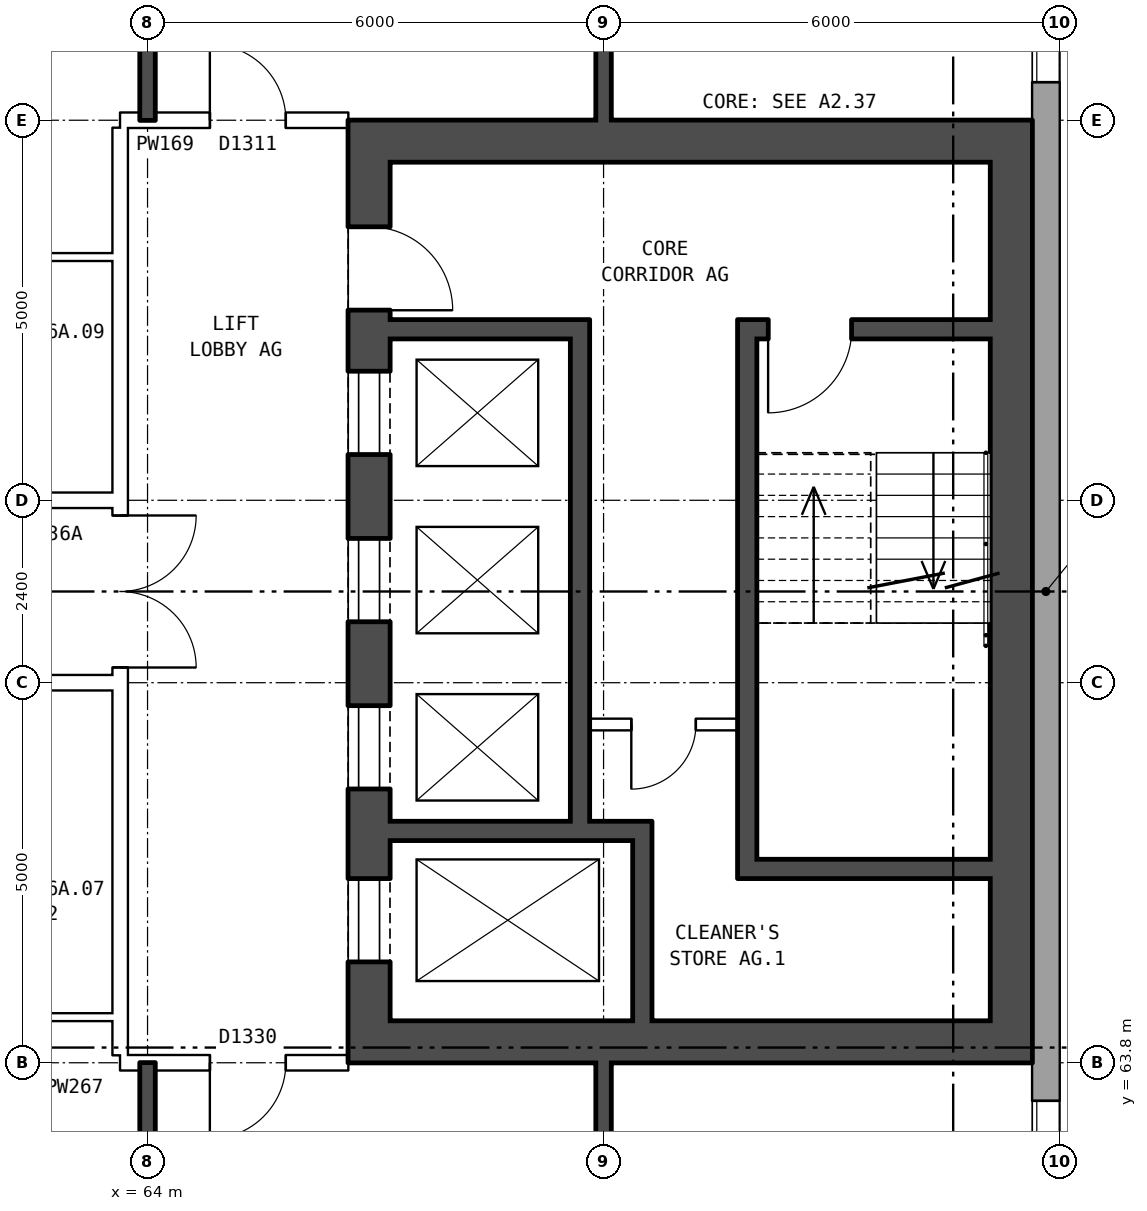
"""IFC4 building model, lengths in metres.
Left out: names, types, materials, properties, quantities, classifications, styles, units other than length and angle.
Written with IfcOpenShell. Run it as: python <this file> out.ifc"""

import sys

from ifc_helpers import new_model, si_unit, direction, frame, frame_2d, origin, place, context, subcontext, project, spatial, rectangle, extrude, element, fill, save


model = new_model("IFC4")
c1 = context("Model", 3, precision=1e-05, world=origin(), true_north=direction((0.0, 1.0)))
c2 = subcontext(c1, "Body", "Model", "MODEL_VIEW")
j1 = project(units=[si_unit("LENGTHUNIT", "METRE"), si_unit("PLANEANGLEUNIT", "RADIAN")], contexts=[c1])
p1 = place(None, origin())
s1 = spatial("IfcSite", under=j1, at=p1, CompositionType="ELEMENT")
p2 = place(p1, origin())
s2 = spatial("IfcBuilding", under=s1, at=p2, CompositionType="ELEMENT")
p3 = place(p2, frame((0.0, 0.0, 129.9)))
s3 = spatial("IfcBuildingStorey", under=s2, at=p3, CompositionType="ELEMENT", Elevation=129.9)
p4 = place(p3, frame((75.82, 57.075, 0.0), z_axis=(0.0, 0.0, 1.0), x_axis=(0.0, 1.0, 0.0)))
e1 = element("IfcWall", 1, at=p4, inside=s3, PredefinedType="STANDARD", context=c2, shape_type="SweptSolid", body=[
    extrude(rectangle(XDim=25.851, YDim=0.36, at=frame_2d((12.925, 0.0))), origin(), (0.0, 0.0, 1.0), 2.85),
])
p5 = place(p4, frame((1.625, 0.0, 0.8)))
e2 = element("IfcOpeningElement", 2, at=p5, cuts=e1, PredefinedType="OPENING", context=c2, shape_type="SweptSolid", body=[
    extrude(rectangle(XDim=1.6, YDim=1.8, at=frame_2d((0.8, 0.9))), frame((0.0, 0.19, 0.0), z_axis=(0.0, -1.0, 0.0), x_axis=(1.0, 0.0, 0.0)), (0.0, 0.0, 1.0), 0.38),
])
p6 = place(p4, frame((4.625, 0.0, 0.8)))
e3 = element("IfcOpeningElement", 3, at=p6, cuts=e1, PredefinedType="OPENING", context=c2, shape_type="SweptSolid", body=[
    extrude(rectangle(XDim=1.6, YDim=1.8, at=frame_2d((0.8, 0.9))), frame((0.0, 0.19, 0.0), z_axis=(0.0, -1.0, 0.0), x_axis=(1.0, 0.0, 0.0)), (0.0, 0.0, 1.0), 0.38),
])
p7 = place(p4, frame((19.625, 0.0, 0.8)))
e4 = element("IfcOpeningElement", 4, at=p7, cuts=e1, PredefinedType="OPENING", context=c2, shape_type="SweptSolid", body=[
    extrude(rectangle(XDim=1.6, YDim=1.8, at=frame_2d((0.8, 0.9))), frame((0.0, 0.19, 0.0), z_axis=(0.0, -1.0, 0.0), x_axis=(1.0, 0.0, 0.0)), (0.0, 0.0, 1.0), 0.38),
])
p8 = place(p4, frame((22.625, 0.0, 0.8)))
e5 = element("IfcOpeningElement", 5, at=p8, cuts=e1, PredefinedType="OPENING", context=c2, shape_type="SweptSolid", body=[
    extrude(rectangle(XDim=1.6, YDim=1.8, at=frame_2d((0.8, 0.9))), frame((0.0, 0.19, 0.0), z_axis=(0.0, -1.0, 0.0), x_axis=(1.0, 0.0, 0.0)), (0.0, 0.0, 1.0), 0.38),
])
p9 = place(p3, frame((66.915, 63.8, 0.0), z_axis=(0.0, 0.0, 1.0), x_axis=(0.0, 1.0, 0.0)))
e6 = element("IfcWall", 6, at=p9, inside=s3, PredefinedType="SHEAR", context=c2, shape_type="SweptSolid", body=[
    extrude(rectangle(XDim=12.4, YDim=0.55, at=frame_2d((6.2, 0.0))), origin(), (0.0, 0.0, 1.0), 2.85),
])
p10 = place(p9, frame((1.325, 0.0, 0.0)))
e7 = element("IfcOpeningElement", 7, at=p10, cuts=e6, PredefinedType="OPENING", context=c2, shape_type="SweptSolid", body=[
    extrude(rectangle(XDim=1.1, YDim=2.1, at=frame_2d((0.55, 1.05))), frame((0.0, 0.285, 0.0), z_axis=(0.0, -1.0, 0.0), x_axis=(1.0, 0.0, 0.0)), (0.0, 0.0, 1.0), 0.57),
])
p11 = place(p9, frame((3.6, 0.0, 0.0)))
e8 = element("IfcOpeningElement", 8, at=p11, cuts=e6, PredefinedType="OPENING", context=c2, shape_type="SweptSolid", body=[
    extrude(rectangle(XDim=1.1, YDim=2.1, at=frame_2d((0.55, 1.05))), frame((0.0, 0.285, 0.0), z_axis=(0.0, -1.0, 0.0), x_axis=(1.0, 0.0, 0.0)), (0.0, 0.0, 1.0), 0.57),
])
p12 = place(p9, frame((5.8, 0.0, 0.0)))
e9 = element("IfcOpeningElement", 9, at=p12, cuts=e6, PredefinedType="OPENING", context=c2, shape_type="SweptSolid", body=[
    extrude(rectangle(XDim=1.1, YDim=2.1, at=frame_2d((0.55, 1.05))), frame((0.0, 0.285, 0.0), z_axis=(0.0, -1.0, 0.0), x_axis=(1.0, 0.0, 0.0)), (0.0, 0.0, 1.0), 0.57),
])
p13 = place(p9, frame((8.0, 0.0, 0.0)))
e10 = element("IfcOpeningElement", 10, at=p13, cuts=e6, PredefinedType="OPENING", context=c2, shape_type="SweptSolid", body=[
    extrude(rectangle(XDim=1.1, YDim=2.1, at=frame_2d((0.55, 1.05))), frame((0.0, 0.285, 0.0), z_axis=(0.0, -1.0, 0.0), x_axis=(1.0, 0.0, 0.0)), (0.0, 0.0, 1.0), 0.57),
])
p14 = place(p9, frame((9.9, 0.0, 0.0)))
e11 = element("IfcOpeningElement", 11, at=p14, cuts=e6, PredefinedType="OPENING", context=c2, shape_type="SweptSolid", body=[
    extrude(rectangle(XDim=1.1, YDim=2.1, at=frame_2d((0.55, 1.05))), frame((0.0, 0.285, 0.0), z_axis=(0.0, -1.0, 0.0), x_axis=(1.0, 0.0, 0.0)), (0.0, 0.0, 1.0), 0.57),
])
p15 = place(p3, frame((75.365, 63.8, 0.0), z_axis=(0.0, 0.0, 1.0), x_axis=(0.0, 1.0, 0.0)))
e12 = element("IfcWall", 12, at=p15, inside=s3, PredefinedType="SHEAR", context=c2, shape_type="SweptSolid", body=[
    extrude(rectangle(XDim=12.4, YDim=0.55, at=frame_2d((6.2, 0.0))), origin(), (0.0, 0.0, 1.0), 2.85),
])
for number, where, z_axis, x_axis in (
    (13, (67.19, 64.075, 0.0), (0.0, 0.0, 1.0), (1.0, 0.0, 0.0)),
    (14, (67.19, 75.925, 0.0), (0.0, 0.0, 1.0), (1.0, 0.0, 0.0)),
):
    element("IfcWall", number, at=place(p3, frame(where, z_axis=z_axis, x_axis=x_axis)), inside=s3, PredefinedType="SHEAR", context=c2, shape_type="SweptSolid", body=[
        extrude(rectangle(XDim=7.9, YDim=0.55, at=frame_2d((3.95, 0.0))), origin(), (0.0, 0.0, 1.0), 2.85),
    ])
p16 = place(p3, frame((72.015, 66.35, 0.0), z_axis=(0.0, 0.0, 1.0), x_axis=(1.0, 0.0, 0.0)))
e15 = element("IfcWall", 15, at=p16, inside=s3, PredefinedType="SHEAR", context=c2, shape_type="SweptSolid", body=[
    extrude(rectangle(XDim=3.075, YDim=0.25, at=frame_2d((1.538, 0.0))), origin(), (0.0, 0.0, 1.0), 2.85),
])
p17 = place(p3, frame((67.19, 66.85, 0.0), z_axis=(0.0, 0.0, 1.0), x_axis=(1.0, 0.0, 0.0)))
e16 = element("IfcWall", 16, at=p17, inside=s3, PredefinedType="SHEAR", context=c2, shape_type="SweptSolid", body=[
    extrude(rectangle(XDim=3.445, YDim=0.25, at=frame_2d((1.723, 0.0))), origin(), (0.0, 0.0, 1.0), 2.85),
])
p18 = place(p3, frame((69.815, 68.25, 0.0), z_axis=(0.0, 0.0, 1.0), x_axis=(1.0, 0.0, 0.0)))
e17 = element("IfcWall", 17, at=p18, inside=s3, PredefinedType="PARTITIONING", context=c2, shape_type="SweptSolid", body=[
    extrude(rectangle(XDim=1.95, YDim=0.15, at=frame_2d((0.975, 0.0))), origin(), (0.0, 0.0, 1.0), 2.85),
])
p19 = place(p18, frame((0.55, 0.0, 0.0)))
e18 = element("IfcOpeningElement", 18, at=p19, cuts=e17, PredefinedType="OPENING", context=c2, shape_type="SweptSolid", body=[
    extrude(rectangle(XDim=0.85, YDim=2.1, at=frame_2d((0.425, 1.05))), frame((0.0, 0.085, 0.0), z_axis=(0.0, -1.0, 0.0), x_axis=(1.0, 0.0, 0.0)), (0.0, 0.0, 1.0), 0.17),
])
p20 = place(p3, frame((67.19, 73.45, 0.0), z_axis=(0.0, 0.0, 1.0), x_axis=(1.0, 0.0, 0.0)))
e19 = element("IfcWall", 19, at=p20, inside=s3, PredefinedType="SHEAR", context=c2, shape_type="SweptSolid", body=[
    extrude(rectangle(XDim=2.375, YDim=0.25, at=frame_2d((1.188, 0.0))), origin(), (0.0, 0.0, 1.0), 2.85),
])
p21 = place(p3, frame((72.015, 73.45, 0.0), z_axis=(0.0, 0.0, 1.0), x_axis=(1.0, 0.0, 0.0)))
e20 = element("IfcWall", 20, at=p21, inside=s3, PredefinedType="SHEAR", context=c2, shape_type="SweptSolid", body=[
    extrude(rectangle(XDim=3.075, YDim=0.25, at=frame_2d((1.538, 0.0))), origin(), (0.0, 0.0, 1.0), 2.85),
])
p22 = place(p21, frame((0.15, 0.0, 0.0)))
e21 = element("IfcOpeningElement", 21, at=p22, cuts=e20, PredefinedType="OPENING", context=c2, shape_type="SweptSolid", body=[
    extrude(rectangle(XDim=1.1, YDim=2.1, at=frame_2d((0.55, 1.05))), frame((0.0, 0.135, 0.0), z_axis=(0.0, -1.0, 0.0), x_axis=(1.0, 0.0, 0.0)), (0.0, 0.0, 1.0), 0.27),
])
p23 = place(p3, frame((69.69, 66.975, 0.0), z_axis=(0.0, 0.0, 1.0), x_axis=(0.0, 1.0, 0.0)))
e22 = element("IfcWall", 22, at=p23, inside=s3, PredefinedType="SHEAR", context=c2, shape_type="SweptSolid", body=[
    extrude(rectangle(XDim=6.6, YDim=0.25, at=frame_2d((3.3, 0.0))), origin(), (0.0, 0.0, 1.0), 2.85),
])
p24 = place(p3, frame((70.51, 64.35, 0.0), z_axis=(0.0, 0.0, 1.0), x_axis=(0.0, 1.0, 0.0)))
e23 = element("IfcWall", 23, at=p24, inside=s3, PredefinedType="SHEAR", context=c2, shape_type="SweptSolid", body=[
    extrude(rectangle(XDim=2.375, YDim=0.25, at=frame_2d((1.188, 0.0))), origin(), (0.0, 0.0, 1.0), 2.85),
])
p25 = place(p3, frame((71.89, 66.225, 0.0), z_axis=(0.0, 0.0, 1.0), x_axis=(0.0, 1.0, 0.0)))
e24 = element("IfcWall", 24, at=p25, inside=s3, PredefinedType="SHEAR", context=c2, shape_type="SweptSolid", body=[
    extrude(rectangle(XDim=7.35, YDim=0.25, at=frame_2d((3.675, 0.0))), origin(), (0.0, 0.0, 1.0), 2.85),
])
p26 = place(p3, frame((63.64, 63.9, 0.0), z_axis=(0.0, 0.0, 1.0), x_axis=(0.0, 1.0, 0.0)))
e25 = element("IfcWall", 25, at=p26, inside=s3, PredefinedType="PARTITIONING", context=c2, shape_type="SweptSolid", body=[
    extrude(rectangle(XDim=12.2, YDim=0.2, at=frame_2d((6.1, 0.0))), origin(), (0.0, 0.0, 1.0), 2.85),
])
p27 = place(p26, frame((5.1, 0.0, 0.0)))
e26 = element("IfcOpeningElement", 26, at=p27, cuts=e25, PredefinedType="OPENING", context=c2, shape_type="SweptSolid", body=[
    extrude(rectangle(XDim=2.0, YDim=2.1, at=frame_2d((1.0, 1.05))), frame((0.0, 0.11, 0.0), z_axis=(0.0, -1.0, 0.0), x_axis=(1.0, 0.0, 0.0)), (0.0, 0.0, 1.0), 0.22),
])
p28 = place(p3, frame((63.64, 63.8, 0.0), z_axis=(0.0, 0.0, 1.0), x_axis=(1.0, 0.0, 0.0)))
e27 = element("IfcWall", 27, at=p28, inside=s3, PredefinedType="PARTITIONING", context=c2, shape_type="SweptSolid", body=[
    extrude(rectangle(XDim=3.0, YDim=0.2, at=frame_2d((1.5, 0.0))), origin(), (0.0, 0.0, 1.0), 2.85),
])
p29 = place(p28, frame((1.18, 0.0, 0.0)))
e28 = element("IfcOpeningElement", 28, at=p29, cuts=e27, PredefinedType="OPENING", context=c2, shape_type="SweptSolid", body=[
    extrude(rectangle(XDim=1.0, YDim=2.1, at=frame_2d((0.5, 1.05))), frame((0.0, 0.11, 0.0), z_axis=(0.0, -1.0, 0.0), x_axis=(1.0, 0.0, 0.0)), (0.0, 0.0, 1.0), 0.22),
])
p30 = place(p3, frame((61.0, 64.4, 0.0), z_axis=(0.0, 0.0, 1.0), x_axis=(1.0, 0.0, 0.0)))
e29 = element("IfcWall", 29, at=p30, inside=s3, PredefinedType="PARTITIONING", context=c2, shape_type="SweptSolid", body=[
    extrude(rectangle(XDim=2.64, YDim=0.1, at=frame_2d((1.32, 0.0))), origin(), (0.0, 0.0, 1.0), 2.85),
])
p31 = place(p3, frame((44.36, 68.8, 0.0), z_axis=(0.0, 0.0, 1.0), x_axis=(1.0, 0.0, 0.0)))
e30 = element("IfcWall", 30, at=p31, inside=s3, PredefinedType="PARTITIONING", context=c2, shape_type="SweptSolid", body=[
    extrude(rectangle(XDim=19.28, YDim=0.2, at=frame_2d((9.64, 0.0))), origin(), (0.0, 0.0, 1.0), 2.85),
])
p32 = place(p31, frame((14.64, 0.0, 0.0)))
e31 = element("IfcOpeningElement", 31, at=p32, cuts=e30, PredefinedType="OPENING", context=c2, shape_type="SweptSolid", body=[
    extrude(rectangle(XDim=1.0, YDim=2.1, at=frame_2d((0.5, 1.05))), frame((0.0, 0.11, 0.0), z_axis=(0.0, -1.0, 0.0), x_axis=(1.0, 0.0, 0.0)), (0.0, 0.0, 1.0), 0.22),
])
p33 = place(p31, frame((5.64, 0.0, 0.0)))
e32 = element("IfcOpeningElement", 32, at=p33, cuts=e30, PredefinedType="OPENING", context=c2, shape_type="SweptSolid", body=[
    extrude(rectangle(XDim=1.0, YDim=2.1, at=frame_2d((0.5, 1.05))), frame((0.0, 0.11, 0.0), z_axis=(0.0, -1.0, 0.0), x_axis=(1.0, 0.0, 0.0)), (0.0, 0.0, 1.0), 0.22),
])
p34 = place(p3, frame((44.36, 71.2, 0.0), z_axis=(0.0, 0.0, 1.0), x_axis=(1.0, 0.0, 0.0)))
e33 = element("IfcWall", 33, at=p34, inside=s3, PredefinedType="PARTITIONING", context=c2, shape_type="SweptSolid", body=[
    extrude(rectangle(XDim=19.28, YDim=0.2, at=frame_2d((9.64, 0.0))), origin(), (0.0, 0.0, 1.0), 2.85),
])
p35 = place(p34, frame((14.64, 0.0, 0.0)))
e34 = element("IfcOpeningElement", 34, at=p35, cuts=e33, PredefinedType="OPENING", context=c2, shape_type="SweptSolid", body=[
    extrude(rectangle(XDim=1.0, YDim=2.1, at=frame_2d((0.5, 1.05))), frame((0.0, 0.11, 0.0), z_axis=(0.0, -1.0, 0.0), x_axis=(1.0, 0.0, 0.0)), (0.0, 0.0, 1.0), 0.22),
])
p36 = place(p34, frame((5.64, 0.0, 0.0)))
e35 = element("IfcOpeningElement", 35, at=p36, cuts=e33, PredefinedType="OPENING", context=c2, shape_type="SweptSolid", body=[
    extrude(rectangle(XDim=1.0, YDim=2.1, at=frame_2d((0.5, 1.05))), frame((0.0, 0.11, 0.0), z_axis=(0.0, -1.0, 0.0), x_axis=(1.0, 0.0, 0.0)), (0.0, 0.0, 1.0), 0.22),
])
p37 = place(p3, frame((61.0, 74.4, 0.0), z_axis=(0.0, 0.0, 1.0), x_axis=(1.0, 0.0, 0.0)))
e36 = element("IfcWall", 36, at=p37, inside=s3, PredefinedType="PARTITIONING", context=c2, shape_type="SweptSolid", body=[
    extrude(rectangle(XDim=2.64, YDim=0.1, at=frame_2d((1.32, 0.0))), origin(), (0.0, 0.0, 1.0), 2.85),
])
p38 = place(p3, frame((63.64, 76.2, 0.0), z_axis=(0.0, 0.0, 1.0), x_axis=(1.0, 0.0, 0.0)))
e37 = element("IfcWall", 37, at=p38, inside=s3, PredefinedType="PARTITIONING", context=c2, shape_type="SweptSolid", body=[
    extrude(rectangle(XDim=3.0, YDim=0.2, at=frame_2d((1.5, 0.0))), origin(), (0.0, 0.0, 1.0), 2.85),
])
p39 = place(p38, frame((1.18, 0.0, 0.0)))
e38 = element("IfcOpeningElement", 38, at=p39, cuts=e37, PredefinedType="OPENING", context=c2, shape_type="SweptSolid", body=[
    extrude(rectangle(XDim=1.0, YDim=2.1, at=frame_2d((0.5, 1.05))), frame((0.0, 0.11, 0.0), z_axis=(0.0, -1.0, 0.0), x_axis=(1.0, 0.0, 0.0)), (0.0, 0.0, 1.0), 0.22),
])
for number, where, z_axis, x_axis in (
    (39, (64.0, 54.36, 0.0), (0.0, 0.0, 1.0), (0.0, 1.0, 0.0)),
    (40, (64.0, 76.2, 0.0), (0.0, 0.0, 1.0), (0.0, 1.0, 0.0)),
):
    element("IfcWall", number, at=place(p3, frame(where, z_axis=z_axis, x_axis=x_axis)), inside=s3, PredefinedType="SOLIDWALL", context=c2, shape_type="SweptSolid", body=[
        extrude(rectangle(XDim=9.44, YDim=0.2, at=frame_2d((4.72, 0.0))), origin(), (0.0, 0.0, 1.0), 2.85),
    ])
p40 = place(p3, frame((70.0, 54.36, 0.0), z_axis=(0.0, 0.0, 1.0), x_axis=(0.0, 1.0, 0.0)))
e41 = element("IfcWall", 41, at=p40, inside=s3, PredefinedType="SOLIDWALL", context=c2, shape_type="SweptSolid", body=[
    extrude(rectangle(XDim=9.44, YDim=0.2, at=frame_2d((4.72, 0.0))), origin(), (0.0, 0.0, 1.0), 2.85),
])
p41 = place(p40, frame((1.37, 0.0, 0.0)))
e42 = element("IfcOpeningElement", 42, at=p41, cuts=e41, PredefinedType="OPENING", context=c2, shape_type="SweptSolid", body=[
    extrude(rectangle(XDim=0.9, YDim=2.1, at=frame_2d((0.45, 1.05))), frame((0.0, 0.11, 0.0), z_axis=(0.0, -1.0, 0.0), x_axis=(1.0, 0.0, 0.0)), (0.0, 0.0, 1.0), 0.22),
])
p42 = place(p40, frame((7.34, 0.0, 0.0)))
e43 = element("IfcOpeningElement", 43, at=p42, cuts=e41, PredefinedType="OPENING", context=c2, shape_type="SweptSolid", body=[
    extrude(rectangle(XDim=0.9, YDim=2.1, at=frame_2d((0.45, 1.05))), frame((0.0, 0.11, 0.0), z_axis=(0.0, -1.0, 0.0), x_axis=(1.0, 0.0, 0.0)), (0.0, 0.0, 1.0), 0.22),
])
p43 = place(p3, frame((70.0, 76.2, 0.0), z_axis=(0.0, 0.0, 1.0), x_axis=(0.0, 1.0, 0.0)))
e44 = element("IfcWall", 44, at=p43, inside=s3, PredefinedType="SOLIDWALL", context=c2, shape_type="SweptSolid", body=[
    extrude(rectangle(XDim=9.44, YDim=0.2, at=frame_2d((4.72, 0.0))), origin(), (0.0, 0.0, 1.0), 2.85),
])
p44 = place(p43, frame((1.5, 0.0, 0.0)))
e45 = element("IfcOpeningElement", 45, at=p44, cuts=e44, PredefinedType="OPENING", context=c2, shape_type="SweptSolid", body=[
    extrude(rectangle(XDim=0.9, YDim=2.1, at=frame_2d((0.45, 1.05))), frame((0.0, 0.11, 0.0), z_axis=(0.0, -1.0, 0.0), x_axis=(1.0, 0.0, 0.0)), (0.0, 0.0, 1.0), 0.22),
])
p45 = place(p6, origin())
e46 = element("IfcWindow", 46, at=p45, inside=s3, PartitioningType="SINGLE_PANEL", PredefinedType="WINDOW", context=c2, shape_type="SweptSolid", body=[
    extrude(rectangle(XDim=1.6, YDim=1.8, at=frame_2d((0.8, 0.9))), frame((0.0, 0.15, 0.0), z_axis=(0.0, -1.0, 0.0), x_axis=(1.0, 0.0, 0.0)), (0.0, 0.0, 1.0), 0.06),
])
fill(e3, e46)
p46 = place(p7, origin())
e47 = element("IfcWindow", 47, at=p46, inside=s3, PartitioningType="SINGLE_PANEL", PredefinedType="WINDOW", context=c2, shape_type="SweptSolid", body=[
    extrude(rectangle(XDim=1.6, YDim=1.8, at=frame_2d((0.8, 0.9))), frame((0.0, 0.15, 0.0), z_axis=(0.0, -1.0, 0.0), x_axis=(1.0, 0.0, 0.0)), (0.0, 0.0, 1.0), 0.06),
])
fill(e4, e47)
p47 = place(p10, origin())
e48 = element("IfcDoor", 48, at=p47, inside=s3, OperationType="DOUBLE_DOOR_SLIDING", PredefinedType="DOOR", context=c2, shape_type="SweptSolid", body=[
    extrude(rectangle(XDim=1.1, YDim=2.1, at=frame_2d((0.55, 1.05))), frame((0.0, -0.21, 0.0), z_axis=(0.0, -1.0, 0.0), x_axis=(1.0, 0.0, 0.0)), (0.0, 0.0, 1.0), 0.05),
])
fill(e7, e48)
p48 = place(p11, origin())
e49 = element("IfcDoor", 49, at=p48, inside=s3, OperationType="DOUBLE_DOOR_SLIDING", PredefinedType="DOOR", context=c2, shape_type="SweptSolid", body=[
    extrude(rectangle(XDim=1.1, YDim=2.1, at=frame_2d((0.55, 1.05))), frame((0.0, -0.21, 0.0), z_axis=(0.0, -1.0, 0.0), x_axis=(1.0, 0.0, 0.0)), (0.0, 0.0, 1.0), 0.05),
])
fill(e8, e49)
p49 = place(p12, origin())
e50 = element("IfcDoor", 50, at=p49, inside=s3, OperationType="DOUBLE_DOOR_SLIDING", PredefinedType="DOOR", context=c2, shape_type="SweptSolid", body=[
    extrude(rectangle(XDim=1.1, YDim=2.1, at=frame_2d((0.55, 1.05))), frame((0.0, -0.21, 0.0), z_axis=(0.0, -1.0, 0.0), x_axis=(1.0, 0.0, 0.0)), (0.0, 0.0, 1.0), 0.05),
])
fill(e9, e50)
p50 = place(p13, origin())
e51 = element("IfcDoor", 51, at=p50, inside=s3, OperationType="DOUBLE_DOOR_SLIDING", PredefinedType="DOOR", context=c2, shape_type="SweptSolid", body=[
    extrude(rectangle(XDim=1.1, YDim=2.1, at=frame_2d((0.55, 1.05))), frame((0.0, -0.21, 0.0), z_axis=(0.0, -1.0, 0.0), x_axis=(1.0, 0.0, 0.0)), (0.0, 0.0, 1.0), 0.05),
])
fill(e10, e51)
p51 = place(p14, frame((1.1, 0.0, 0.0), z_axis=(0.0, 0.0, 1.0), x_axis=(-1.0, 0.0, 0.0)))
e52 = element("IfcDoor", 52, at=p51, inside=s3, OperationType="SINGLE_SWING_RIGHT", PredefinedType="DOOR", context=c2, shape_type="SweptSolid", body=[
    extrude(rectangle(XDim=1.1, YDim=2.1, at=frame_2d((0.55, 1.05))), frame((0.0, 0.26, 0.0), z_axis=(0.0, -1.0, 0.0), x_axis=(1.0, 0.0, 0.0)), (0.0, 0.0, 1.0), 0.05),
])
fill(e11, e52)
p52 = place(p22, frame((1.1, 0.0, 0.0), z_axis=(0.0, 0.0, 1.0), x_axis=(-1.0, 0.0, 0.0)))
e53 = element("IfcDoor", 53, at=p52, inside=s3, OperationType="SINGLE_SWING_RIGHT", PredefinedType="DOOR", context=c2, shape_type="SweptSolid", body=[
    extrude(rectangle(XDim=1.1, YDim=2.1, at=frame_2d((0.55, 1.05))), frame((0.0, 0.025, 0.0), z_axis=(0.0, -1.0, 0.0), x_axis=(1.0, 0.0, 0.0)), (0.0, 0.0, 1.0), 0.05),
])
fill(e21, e53)
p53 = place(p19, frame((0.85, 0.0, 0.0), z_axis=(0.0, 0.0, 1.0), x_axis=(-1.0, 0.0, 0.0)))
e54 = element("IfcDoor", 54, at=p53, inside=s3, OperationType="SINGLE_SWING_RIGHT", PredefinedType="DOOR", context=c2, shape_type="SweptSolid", body=[
    extrude(rectangle(XDim=0.85, YDim=2.1, at=frame_2d((0.425, 1.05))), frame((0.0, 0.025, 0.0), z_axis=(0.0, -1.0, 0.0), x_axis=(1.0, 0.0, 0.0)), (0.0, 0.0, 1.0), 0.05),
])
fill(e18, e54)
p54 = place(p27, frame((2.0, 0.0, 0.0), z_axis=(0.0, 0.0, 1.0), x_axis=(-1.0, 0.0, 0.0)))
e55 = element("IfcDoor", 55, at=p54, inside=s3, OperationType="DOUBLE_DOOR_SINGLE_SWING", PredefinedType="DOOR", context=c2, shape_type="SweptSolid", body=[
    extrude(rectangle(XDim=2.0, YDim=2.1, at=frame_2d((1.0, 1.05))), frame((0.0, 0.025, 0.0), z_axis=(0.0, -1.0, 0.0), x_axis=(1.0, 0.0, 0.0)), (0.0, 0.0, 1.0), 0.05),
])
fill(e26, e55)
p55 = place(p29, frame((1.0, 0.0, 0.0), z_axis=(0.0, 0.0, 1.0), x_axis=(-1.0, 0.0, 0.0)))
e56 = element("IfcDoor", 56, at=p55, inside=s3, OperationType="SINGLE_SWING_RIGHT", PredefinedType="DOOR", context=c2, shape_type="SweptSolid", body=[
    extrude(rectangle(XDim=1.0, YDim=2.1, at=frame_2d((0.5, 1.05))), frame((0.0, 0.025, 0.0), z_axis=(0.0, -1.0, 0.0), x_axis=(1.0, 0.0, 0.0)), (0.0, 0.0, 1.0), 0.05),
])
fill(e28, e56)
p56 = place(p39, origin())
e57 = element("IfcDoor", 57, at=p56, inside=s3, OperationType="SINGLE_SWING_LEFT", PredefinedType="DOOR", context=c2, shape_type="SweptSolid", body=[
    extrude(rectangle(XDim=1.0, YDim=2.1, at=frame_2d((0.5, 1.05))), frame((0.0, 0.025, 0.0), z_axis=(0.0, -1.0, 0.0), x_axis=(1.0, 0.0, 0.0)), (0.0, 0.0, 1.0), 0.05),
])
fill(e38, e57)
save(model, sys.argv[1])
